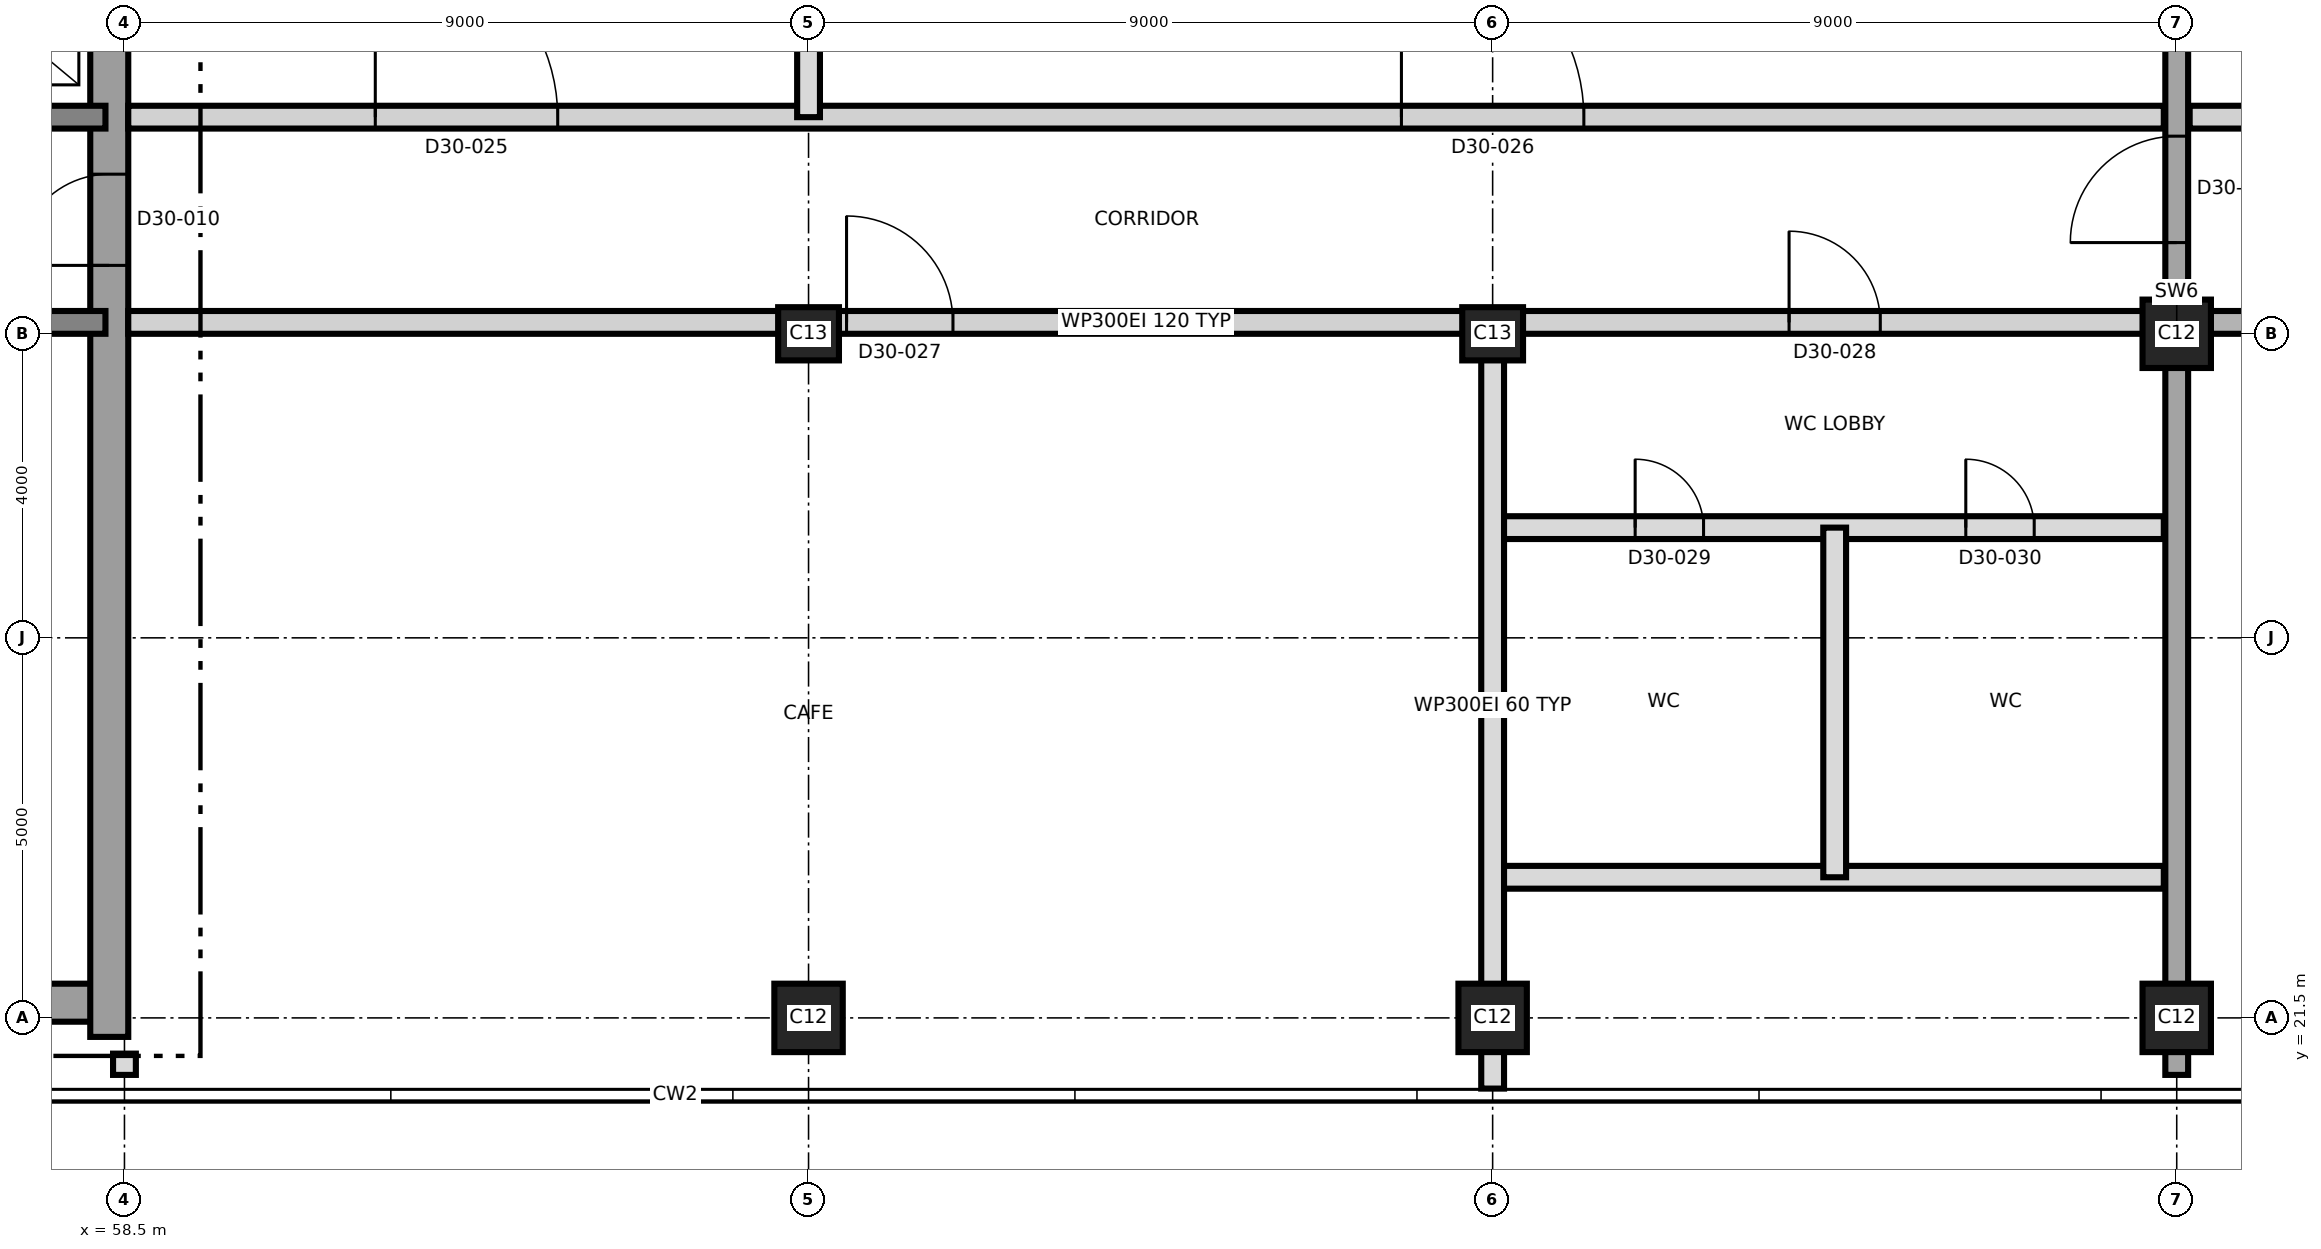
"""IFC4 building model, lengths in metres.
Left out: names, types, materials, properties, quantities, classifications, styles, units other than length and angle.
Written with IfcOpenShell. Run it as: python <this file> out.ifc"""

import sys

from ifc_helpers import new_model, si_unit, direction, frame, frame_2d, origin, origin_2d, place, context, subcontext, project, spatial, rectangle, extrude, element, fill, save


model = new_model("IFC4")
c1 = context("Model", 3, precision=1e-05, world=origin(), true_north=direction((0.0, 1.0)))
c2 = subcontext(c1, "Body", "Model", "MODEL_VIEW")
j1 = project(units=[si_unit("LENGTHUNIT", "METRE"), si_unit("PLANEANGLEUNIT", "RADIAN")], contexts=[c1])
p1 = place(None, origin())
s1 = spatial("IfcSite", under=j1, at=p1, CompositionType="ELEMENT")
p2 = place(p1, origin())
s2 = spatial("IfcBuilding", under=s1, at=p2, CompositionType="ELEMENT")
p3 = place(p2, frame((0.0, 0.0, 260.9)))
s3 = spatial("IfcBuildingStorey", under=s2, at=p3, CompositionType="ELEMENT", Elevation=260.9)
p4 = place(p3, frame((31.25, 21.7, 0.0), z_axis=(0.0, 0.0, 1.0), x_axis=(1.0, 0.0, 0.0)))
e1 = element("IfcWall", 1, at=p4, inside=s3, PredefinedType="SHEAR", context=c2, shape_type="SweptSolid", body=[
    extrude(rectangle(XDim=27.0, YDim=0.5, at=frame_2d((13.5, 0.0))), origin(), (0.0, 0.0, 1.0), 6.0),
])
p5 = place(p3, frame((58.3, 21.25, 0.0), z_axis=(0.0, 0.0, 1.0), x_axis=(0.0, 1.0, 0.0)))
e2 = element("IfcWall", 2, at=p5, inside=s3, PredefinedType="SHEAR", context=c2, shape_type="SweptSolid", body=[
    extrude(rectangle(XDim=18.5, YDim=0.5, at=frame_2d((9.25, 0.0))), origin(), (0.0, 0.0, 1.0), 6.0),
])
p6 = place(p5, frame((10.15, 0.0, 0.0)))
e3 = element("IfcOpeningElement", 3, at=p6, cuts=e2, PredefinedType="OPENING", context=c2, shape_type="SweptSolid", body=[
    extrude(rectangle(XDim=1.2, YDim=2.1, at=frame_2d((0.6, 1.05))), frame((0.0, 0.26, 0.0), z_axis=(0.0, -1.0, 0.0), x_axis=(1.0, 0.0, 0.0)), (0.0, 0.0, 1.0), 0.52),
])
p7 = place(p3, frame((31.75, 30.65, 0.0), z_axis=(0.0, 0.0, 1.0), x_axis=(1.0, 0.0, 0.0)))
e4 = element("IfcWall", 4, at=p7, inside=s3, PredefinedType="SHEAR", context=c2, shape_type="SweptSolid", body=[
    extrude(rectangle(XDim=26.5, YDim=0.3, at=frame_2d((13.25, 0.0))), origin(), (0.0, 0.0, 1.0), 6.0),
])
p8 = place(p7, frame((24.75, 0.0, 0.0)))
e5 = element("IfcOpeningElement", 5, at=p8, cuts=e4, PredefinedType="OPENING", context=c2, shape_type="SweptSolid", body=[
    extrude(rectangle(XDim=1.0, YDim=2.1, at=frame_2d((0.5, 1.05))), frame((0.0, 0.16, 0.0), z_axis=(0.0, -1.0, 0.0), x_axis=(1.0, 0.0, 0.0)), (0.0, 0.0, 1.0), 0.32),
])
p9 = place(p7, frame((11.55, 0.0, 0.0)))
e6 = element("IfcOpeningElement", 6, at=p9, cuts=e4, PredefinedType="OPENING", context=c2, shape_type="SweptSolid", body=[
    extrude(rectangle(XDim=1.0, YDim=2.1, at=frame_2d((0.5, 1.05))), frame((0.0, 0.16, 0.0), z_axis=(0.0, -1.0, 0.0), x_axis=(1.0, 0.0, 0.0)), (0.0, 0.0, 1.0), 0.32),
])
p10 = place(p3, frame((31.75, 33.35, 0.0), z_axis=(0.0, 0.0, 1.0), x_axis=(1.0, 0.0, 0.0)))
e7 = element("IfcWall", 7, at=p10, inside=s3, PredefinedType="SHEAR", context=c2, shape_type="SweptSolid", body=[
    extrude(rectangle(XDim=26.5, YDim=0.3, at=frame_2d((13.25, 0.0))), origin(), (0.0, 0.0, 1.0), 6.0),
])
p11 = place(p10, frame((13.9, 0.0, 0.0)))
e8 = element("IfcOpeningElement", 8, at=p11, cuts=e7, PredefinedType="OPENING", context=c2, shape_type="SweptSolid", body=[
    extrude(rectangle(XDim=1.4, YDim=2.1, at=frame_2d((0.7, 1.05))), frame((0.0, 0.16, 0.0), z_axis=(0.0, -1.0, 0.0), x_axis=(1.0, 0.0, 0.0)), (0.0, 0.0, 1.0), 0.32),
])
p12 = place(p10, frame((5.375, 0.0, 0.0)))
e9 = element("IfcOpeningElement", 9, at=p12, cuts=e7, PredefinedType="OPENING", context=c2, shape_type="SweptSolid", body=[
    extrude(rectangle(XDim=1.2, YDim=2.1, at=frame_2d((0.6, 1.05))), frame((0.0, 0.16, 0.0), z_axis=(0.0, -1.0, 0.0), x_axis=(1.0, 0.0, 0.0)), (0.0, 0.0, 1.0), 0.32),
])
p13 = place(p10, frame((19.925, 0.0, 0.0)))
e10 = element("IfcOpeningElement", 10, at=p13, cuts=e7, PredefinedType="OPENING", context=c2, shape_type="SweptSolid", body=[
    extrude(rectangle(XDim=1.2, YDim=2.1, at=frame_2d((0.6, 1.05))), frame((0.0, 0.16, 0.0), z_axis=(0.0, -1.0, 0.0), x_axis=(1.0, 0.0, 0.0)), (0.0, 0.0, 1.0), 0.32),
])
for number, where, z_axis, x_axis in (
    (11, (67.5, 21.5, 0.0), (0.0, 0.0, 1.0), (1.0, 0.0, 0.0)),
    (12, (76.5, 21.5, 0.0), (0.0, 0.0, 1.0), (1.0, 0.0, 0.0)),
    (13, (85.5, 21.5, 0.0), (0.0, 0.0, 1.0), (1.0, 0.0, 0.0)),
):
    element("IfcColumn", number, at=place(p3, frame(where, z_axis=z_axis, x_axis=x_axis)), inside=s3, PredefinedType="COLUMN", context=c2, shape_type="SweptSolid", body=[
        extrude(rectangle(XDim=0.9, YDim=0.9, at=origin_2d()), origin(), (0.0, 0.0, 1.0), 6.0),
    ])
for number, where, z_axis, x_axis in (
    (14, (67.5, 30.5, 0.0), (0.0, 0.0, 1.0), (1.0, 0.0, 0.0)),
    (15, (76.5, 30.5, 0.0), (0.0, 0.0, 1.0), (1.0, 0.0, 0.0)),
):
    element("IfcColumn", number, at=place(p3, frame(where, z_axis=z_axis, x_axis=x_axis)), inside=s3, PredefinedType="COLUMN", context=c2, shape_type="SweptSolid", body=[
        extrude(rectangle(XDim=0.8, YDim=0.7, at=origin_2d()), origin(), (0.0, 0.0, 1.0), 6.0),
    ])
p14 = place(p3, frame((85.5, 30.5, 0.0), z_axis=(0.0, 0.0, 1.0), x_axis=(1.0, 0.0, 0.0)))
e16 = element("IfcColumn", 16, at=p14, inside=s3, PredefinedType="COLUMN", context=c2, shape_type="SweptSolid", body=[
    extrude(rectangle(XDim=0.9, YDim=0.9, at=origin_2d()), origin(), (0.0, 0.0, 1.0), 6.0),
])
p15 = place(p3, frame((85.5, 20.75, 0.0), z_axis=(0.0, 0.0, 1.0), x_axis=(0.0, 1.0, 0.0)))
e17 = element("IfcWall", 17, at=p15, inside=s3, PredefinedType="SHEAR", context=c2, shape_type="SweptSolid", body=[
    extrude(rectangle(XDim=19.5, YDim=0.3, at=frame_2d((9.75, 0.0))), origin(), (0.0, 0.0, 1.0), 6.0),
])
p16 = place(p15, frame((10.95, 0.0, 0.0)))
e18 = element("IfcOpeningElement", 18, at=p16, cuts=e17, PredefinedType="OPENING", context=c2, shape_type="SweptSolid", body=[
    extrude(rectangle(XDim=1.4, YDim=2.1, at=frame_2d((0.7, 1.05))), frame((0.0, 0.16, 0.0), z_axis=(0.0, -1.0, 0.0), x_axis=(1.0, 0.0, 0.0)), (0.0, 0.0, 1.0), 0.32),
])
p17 = place(p3, frame((76.5, 23.35, 0.0), z_axis=(0.0, 0.0, 1.0), x_axis=(1.0, 0.0, 0.0)))
e19 = element("IfcWall", 19, at=p17, inside=s3, PredefinedType="PARTITIONING", context=c2, shape_type="SweptSolid", body=[
    extrude(rectangle(XDim=8.83, YDim=0.3, at=frame_2d((4.415, 0.0))), origin(), (0.0, 0.0, 1.0), 5.7),
])
p18 = place(p3, frame((76.5, 27.95, 0.0), z_axis=(0.0, 0.0, 1.0), x_axis=(1.0, 0.0, 0.0)))
e20 = element("IfcWall", 20, at=p18, inside=s3, PredefinedType="PARTITIONING", context=c2, shape_type="SweptSolid", body=[
    extrude(rectangle(XDim=8.83, YDim=0.3, at=frame_2d((4.415, 0.0))), origin(), (0.0, 0.0, 1.0), 5.7),
])
p19 = place(p18, frame((1.875, 0.0, 0.0)))
e21 = element("IfcOpeningElement", 21, at=p19, cuts=e20, PredefinedType="OPENING", context=c2, shape_type="SweptSolid", body=[
    extrude(rectangle(XDim=0.9, YDim=2.1, at=frame_2d((0.45, 1.05))), frame((0.0, 0.16, 0.0), z_axis=(0.0, -1.0, 0.0), x_axis=(1.0, 0.0, 0.0)), (0.0, 0.0, 1.0), 0.32),
])
p20 = place(p18, frame((6.225, 0.0, 0.0)))
e22 = element("IfcOpeningElement", 22, at=p20, cuts=e20, PredefinedType="OPENING", context=c2, shape_type="SweptSolid", body=[
    extrude(rectangle(XDim=0.9, YDim=2.1, at=frame_2d((0.45, 1.05))), frame((0.0, 0.16, 0.0), z_axis=(0.0, -1.0, 0.0), x_axis=(1.0, 0.0, 0.0)), (0.0, 0.0, 1.0), 0.32),
])
p21 = place(p3, frame((58.55, 30.65, 0.0), z_axis=(0.0, 0.0, 1.0), x_axis=(1.0, 0.0, 0.0)))
e23 = element("IfcWall", 23, at=p21, inside=s3, PredefinedType="PARTITIONING", context=c2, shape_type="SweptSolid", body=[
    extrude(rectangle(XDim=26.78, YDim=0.3, at=frame_2d((13.39, 0.0))), origin(), (0.0, 0.0, 1.0), 5.7),
])
p22 = place(p21, frame((9.45, 0.0, 0.0)))
e24 = element("IfcOpeningElement", 24, at=p22, cuts=e23, PredefinedType="OPENING", context=c2, shape_type="SweptSolid", body=[
    extrude(rectangle(XDim=1.4, YDim=2.1, at=frame_2d((0.7, 1.05))), frame((0.0, 0.16, 0.0), z_axis=(0.0, -1.0, 0.0), x_axis=(1.0, 0.0, 0.0)), (0.0, 0.0, 1.0), 0.32),
])
p23 = place(p21, frame((21.85, 0.0, 0.0)))
e25 = element("IfcOpeningElement", 25, at=p23, cuts=e23, PredefinedType="OPENING", context=c2, shape_type="SweptSolid", body=[
    extrude(rectangle(XDim=1.2, YDim=2.1, at=frame_2d((0.6, 1.05))), frame((0.0, 0.16, 0.0), z_axis=(0.0, -1.0, 0.0), x_axis=(1.0, 0.0, 0.0)), (0.0, 0.0, 1.0), 0.32),
])
p24 = place(p3, frame((85.67, 30.65, 0.0), z_axis=(0.0, 0.0, 1.0), x_axis=(1.0, 0.0, 0.0)))
e26 = element("IfcWall", 26, at=p24, inside=s3, PredefinedType="SHEAR", context=c2, shape_type="SweptSolid", body=[
    extrude(rectangle(XDim=9.76, YDim=0.3, at=frame_2d((4.88, 0.0))), origin(), (0.0, 0.0, 1.0), 5.7),
])
p25 = place(p24, frame((2.08, 0.0, 0.0)))
e27 = element("IfcOpeningElement", 27, at=p25, cuts=e26, PredefinedType="OPENING", context=c2, shape_type="SweptSolid", body=[
    extrude(rectangle(XDim=1.2, YDim=2.1, at=frame_2d((0.6, 1.05))), frame((0.0, 0.16, 0.0), z_axis=(0.0, -1.0, 0.0), x_axis=(1.0, 0.0, 0.0)), (0.0, 0.0, 1.0), 0.32),
])
p26 = place(p24, frame((5.63, 0.0, 0.0)))
e28 = element("IfcOpeningElement", 28, at=p26, cuts=e26, PredefinedType="OPENING", context=c2, shape_type="SweptSolid", body=[
    extrude(rectangle(XDim=1.0, YDim=2.1, at=frame_2d((0.5, 1.05))), frame((0.0, 0.16, 0.0), z_axis=(0.0, -1.0, 0.0), x_axis=(1.0, 0.0, 0.0)), (0.0, 0.0, 1.0), 0.32),
])
p27 = place(p3, frame((58.55, 33.35, 0.0), z_axis=(0.0, 0.0, 1.0), x_axis=(1.0, 0.0, 0.0)))
e29 = element("IfcWall", 29, at=p27, inside=s3, PredefinedType="PARTITIONING", context=c2, shape_type="SweptSolid", body=[
    extrude(rectangle(XDim=26.78, YDim=0.3, at=frame_2d((13.39, 0.0))), origin(), (0.0, 0.0, 1.0), 5.7),
])
p28 = place(p27, frame((3.25, 0.0, 0.0)))
e30 = element("IfcOpeningElement", 30, at=p28, cuts=e29, PredefinedType="OPENING", context=c2, shape_type="SweptSolid", body=[
    extrude(rectangle(XDim=2.4, YDim=2.4, at=frame_2d((1.2, 1.2))), frame((0.0, 0.16, 0.0), z_axis=(0.0, -1.0, 0.0), x_axis=(1.0, 0.0, 0.0)), (0.0, 0.0, 1.0), 0.32),
])
p29 = place(p27, frame((16.75, 0.0, 0.0)))
e31 = element("IfcOpeningElement", 31, at=p29, cuts=e29, PredefinedType="OPENING", context=c2, shape_type="SweptSolid", body=[
    extrude(rectangle(XDim=2.4, YDim=2.4, at=frame_2d((1.2, 1.2))), frame((0.0, 0.16, 0.0), z_axis=(0.0, -1.0, 0.0), x_axis=(1.0, 0.0, 0.0)), (0.0, 0.0, 1.0), 0.32),
])
p30 = place(p3, frame((85.67, 33.35, 0.0), z_axis=(0.0, 0.0, 1.0), x_axis=(1.0, 0.0, 0.0)))
e32 = element("IfcWall", 32, at=p30, inside=s3, PredefinedType="PARTITIONING", context=c2, shape_type="SweptSolid", body=[
    extrude(rectangle(XDim=9.724, YDim=0.3, at=frame_2d((4.862, 0.0))), origin(), (0.0, 0.0, 1.0), 5.7),
])
p31 = place(p30, frame((1.83, 0.0, 0.0)))
e33 = element("IfcOpeningElement", 33, at=p31, cuts=e32, PredefinedType="OPENING", context=c2, shape_type="SweptSolid", body=[
    extrude(rectangle(XDim=1.0, YDim=2.1, at=frame_2d((0.5, 1.05))), frame((0.0, 0.16, 0.0), z_axis=(0.0, -1.0, 0.0), x_axis=(1.0, 0.0, 0.0)), (0.0, 0.0, 1.0), 0.32),
])
p32 = place(p30, frame((5.63, 0.0, 0.0)))
e34 = element("IfcOpeningElement", 34, at=p32, cuts=e32, PredefinedType="OPENING", context=c2, shape_type="SweptSolid", body=[
    extrude(rectangle(XDim=1.0, YDim=2.1, at=frame_2d((0.5, 1.05))), frame((0.0, 0.16, 0.0), z_axis=(0.0, -1.0, 0.0), x_axis=(1.0, 0.0, 0.0)), (0.0, 0.0, 1.0), 0.32),
])
p33 = place(p3, frame((58.5, 20.75, 0.0), z_axis=(0.0, 0.0, 1.0), x_axis=(0.0, 1.0, 0.0)))
e35 = element("IfcWall", 35, at=p33, inside=s3, PredefinedType="PARTITIONING", context=c2, shape_type="SweptSolid", body=[
    extrude(rectangle(XDim=0.28, YDim=0.3, at=frame_2d((0.14, 0.0))), origin(), (0.0, 0.0, 1.0), 5.7),
])
p34 = place(p3, frame((67.5, 33.35, 0.0), z_axis=(0.0, 0.0, 1.0), x_axis=(0.0, 1.0, 0.0)))
e36 = element("IfcWall", 36, at=p34, inside=s3, PredefinedType="PARTITIONING", context=c2, shape_type="SweptSolid", body=[
    extrude(rectangle(XDim=7.08, YDim=0.3, at=frame_2d((3.54, 0.0))), origin(), (0.0, 0.0, 1.0), 5.7),
])
p35 = place(p3, frame((76.5, 20.57, 0.0), z_axis=(0.0, 0.0, 1.0), x_axis=(0.0, 1.0, 0.0)))
e37 = element("IfcWall", 37, at=p35, inside=s3, PredefinedType="PARTITIONING", context=c2, shape_type="SweptSolid", body=[
    extrude(rectangle(XDim=10.08, YDim=0.3, at=frame_2d((5.04, 0.0))), origin(), (0.0, 0.0, 1.0), 5.7),
])
p36 = place(p3, frame((81.0, 23.35, 0.0), z_axis=(0.0, 0.0, 1.0), x_axis=(0.0, 1.0, 0.0)))
e38 = element("IfcWall", 38, at=p36, inside=s3, PredefinedType="PARTITIONING", context=c2, shape_type="SweptSolid", body=[
    extrude(rectangle(XDim=4.6, YDim=0.3, at=frame_2d((2.3, 0.0))), origin(), (0.0, 0.0, 1.0), 5.7),
])
p37 = place(p6, origin())
e39 = element("IfcDoor", 39, at=p37, inside=s3, OperationType="SINGLE_SWING_LEFT", PredefinedType="DOOR", context=c2, shape_type="SweptSolid", body=[
    extrude(rectangle(XDim=1.2, YDim=2.1, at=frame_2d((0.6, 1.05))), frame((0.0, 0.025, 0.0), z_axis=(0.0, -1.0, 0.0), x_axis=(1.0, 0.0, 0.0)), (0.0, 0.0, 1.0), 0.05),
])
fill(e3, e39)
p38 = place(p28, origin())
e40 = element("IfcDoor", 40, at=p38, inside=s3, OperationType="SINGLE_SWING_LEFT", PredefinedType="DOOR", context=c2, shape_type="SweptSolid", body=[
    extrude(rectangle(XDim=2.4, YDim=2.4, at=frame_2d((1.2, 1.2))), frame((0.0, 0.025, 0.0), z_axis=(0.0, -1.0, 0.0), x_axis=(1.0, 0.0, 0.0)), (0.0, 0.0, 1.0), 0.05),
])
fill(e30, e40)
p39 = place(p29, origin())
e41 = element("IfcDoor", 41, at=p39, inside=s3, OperationType="SINGLE_SWING_LEFT", PredefinedType="DOOR", context=c2, shape_type="SweptSolid", body=[
    extrude(rectangle(XDim=2.4, YDim=2.4, at=frame_2d((1.2, 1.2))), frame((0.0, 0.025, 0.0), z_axis=(0.0, -1.0, 0.0), x_axis=(1.0, 0.0, 0.0)), (0.0, 0.0, 1.0), 0.05),
])
fill(e31, e41)
p40 = place(p22, origin())
e42 = element("IfcDoor", 42, at=p40, inside=s3, OperationType="SINGLE_SWING_LEFT", PredefinedType="DOOR", context=c2, shape_type="SweptSolid", body=[
    extrude(rectangle(XDim=1.4, YDim=2.1, at=frame_2d((0.7, 1.05))), frame((0.0, 0.025, 0.0), z_axis=(0.0, -1.0, 0.0), x_axis=(1.0, 0.0, 0.0)), (0.0, 0.0, 1.0), 0.05),
])
fill(e24, e42)
p41 = place(p23, origin())
e43 = element("IfcDoor", 43, at=p41, inside=s3, OperationType="SINGLE_SWING_LEFT", PredefinedType="DOOR", context=c2, shape_type="SweptSolid", body=[
    extrude(rectangle(XDim=1.2, YDim=2.1, at=frame_2d((0.6, 1.05))), frame((0.0, 0.025, 0.0), z_axis=(0.0, -1.0, 0.0), x_axis=(1.0, 0.0, 0.0)), (0.0, 0.0, 1.0), 0.05),
])
fill(e25, e43)
p42 = place(p19, origin())
e44 = element("IfcDoor", 44, at=p42, inside=s3, OperationType="SINGLE_SWING_LEFT", PredefinedType="DOOR", context=c2, shape_type="SweptSolid", body=[
    extrude(rectangle(XDim=0.9, YDim=2.1, at=frame_2d((0.45, 1.05))), frame((0.0, 0.025, 0.0), z_axis=(0.0, -1.0, 0.0), x_axis=(1.0, 0.0, 0.0)), (0.0, 0.0, 1.0), 0.05),
])
fill(e21, e44)
p43 = place(p20, origin())
e45 = element("IfcDoor", 45, at=p43, inside=s3, OperationType="SINGLE_SWING_RIGHT", PredefinedType="DOOR", context=c2, shape_type="SweptSolid", body=[
    extrude(rectangle(XDim=0.9, YDim=2.1, at=frame_2d((0.45, 1.05))), frame((0.0, 0.025, 0.0), z_axis=(0.0, -1.0, 0.0), x_axis=(1.0, 0.0, 0.0)), (0.0, 0.0, 1.0), 0.05),
])
fill(e22, e45)
p44 = place(p16, origin())
e46 = element("IfcDoor", 46, at=p44, inside=s3, OperationType="SINGLE_SWING_RIGHT", PredefinedType="DOOR", context=c2, shape_type="SweptSolid", body=[
    extrude(rectangle(XDim=1.4, YDim=2.1, at=frame_2d((0.7, 1.05))), frame((0.0, 0.025, 0.0), z_axis=(0.0, -1.0, 0.0), x_axis=(1.0, 0.0, 0.0)), (0.0, 0.0, 1.0), 0.05),
])
fill(e18, e46)
save(model, sys.argv[1])
